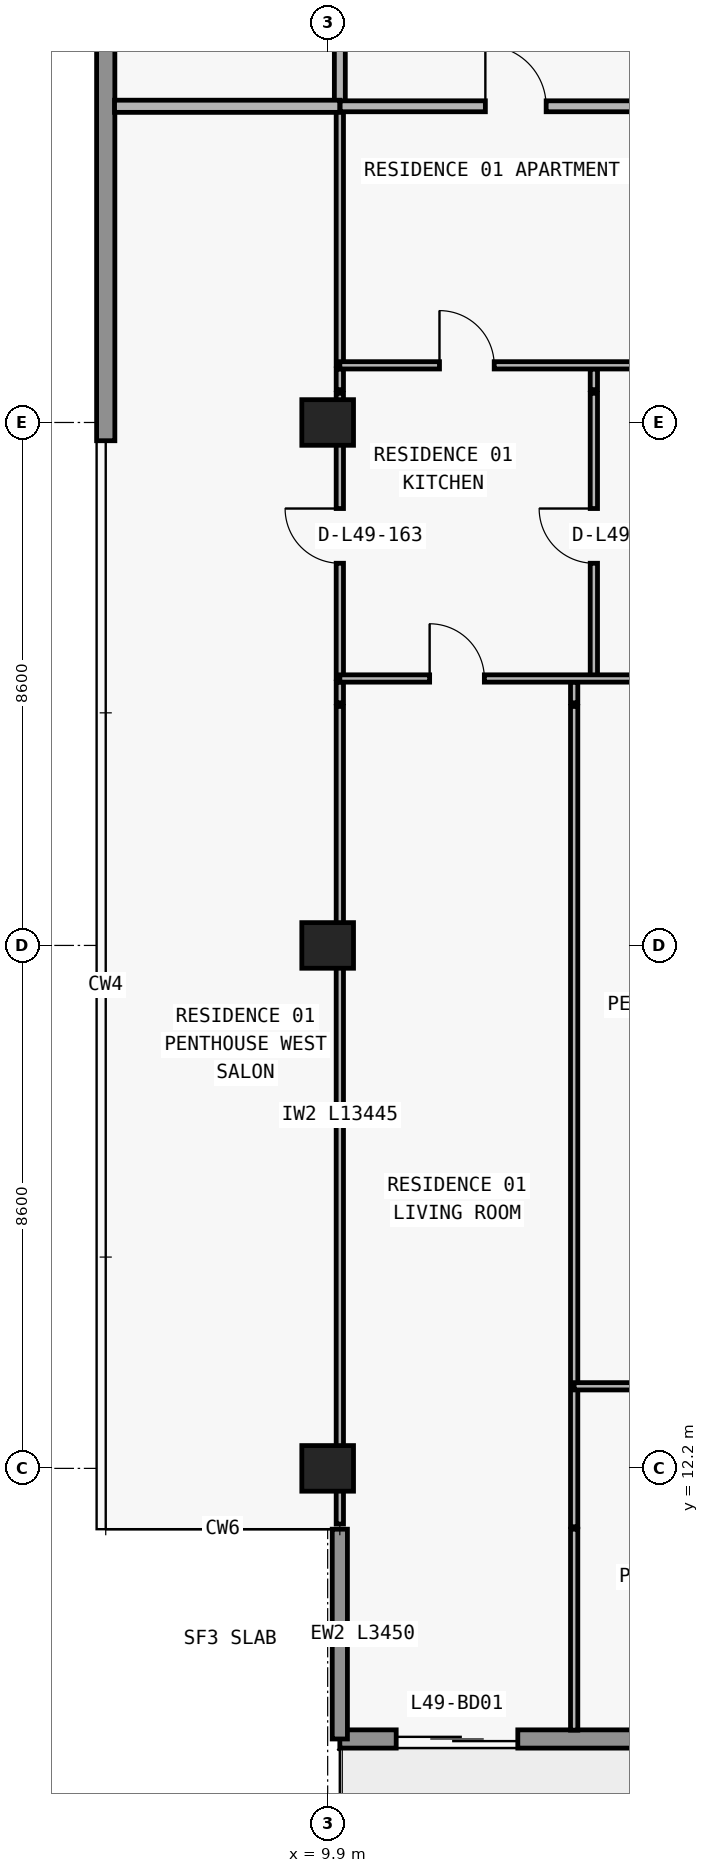
"""IFC4 building model, lengths in metres.
Left out: names, types, materials, properties, quantities, classifications, styles, units other than length and angle.
Written with IfcOpenShell. Run it as: python <this file> out.ifc"""

import sys

from ifc_helpers import new_model, si_unit, direction, frame, frame_2d, origin, origin_2d, place, context, subcontext, project, spatial, rectangle, extrude, element, fill, save


model = new_model("IFC4")
c1 = context("Model", 3, precision=1e-05, world=origin(), true_north=direction((0.0, 1.0)))
c2 = subcontext(c1, "Body", "Model", "MODEL_VIEW")
j1 = project(units=[si_unit("LENGTHUNIT", "METRE"), si_unit("PLANEANGLEUNIT", "RADIAN")], contexts=[c1])
p1 = place(None, origin())
s1 = spatial("IfcSite", under=j1, at=p1, CompositionType="ELEMENT")
p2 = place(p1, origin())
s2 = spatial("IfcBuilding", under=s1, at=p2, CompositionType="ELEMENT")
p3 = place(p2, frame((0.0, 0.0, 177.0)))
s3 = spatial("IfcBuildingStorey", under=s2, at=p3, CompositionType="ELEMENT", Elevation=177.0)
for number, where, z_axis, x_axis in (
    (1, (9.9, 12.2, 0.0), (0.0, 0.0, 1.0), (1.0, 0.0, 0.0)),
    (2, (9.9, 20.8, 0.0), (0.0, 0.0, 1.0), (1.0, 0.0, 0.0)),
    (3, (9.9, 29.4, 0.0), (0.0, 0.0, 1.0), (1.0, 0.0, 0.0)),
):
    element("IfcColumn", number, at=place(p3, frame(where, z_axis=z_axis, x_axis=x_axis)), inside=s3, PredefinedType="COLUMN", context=c2, shape_type="SweptSolid", body=[
        extrude(rectangle(XDim=0.85, YDim=0.75, at=origin_2d()), origin(), (0.0, 0.0, 1.0), 3.05),
    ])
p4 = place(p3, frame((67.7, 7.75, 0.0), z_axis=(0.0, 0.0, 1.0), x_axis=(-1.0, 0.0, 0.0)))
e4 = element("IfcWall", 4, at=p4, inside=s3, PredefinedType="STANDARD", context=c2, shape_type="SweptSolid", body=[
    extrude(rectangle(XDim=57.6, YDim=0.3, at=frame_2d((28.8, 0.0))), origin(), (0.0, 0.0, 1.0), 3.05),
])
p5 = place(p4, frame((54.673, 0.0, 0.0)))
e5 = element("IfcOpeningElement", 5, at=p5, cuts=e4, PredefinedType="OPENING", context=c2, shape_type="SweptSolid", body=[
    extrude(rectangle(XDim=2.0, YDim=2.3, at=frame_2d((1.0, 1.15))), frame((0.0, 0.16, 0.0), z_axis=(0.0, -1.0, 0.0), x_axis=(1.0, 0.0, 0.0)), (0.0, 0.0, 1.0), 0.32),
])
p6 = place(p4, frame((50.473, 0.0, 0.85)))
e6 = element("IfcOpeningElement", 6, at=p6, cuts=e4, PredefinedType="OPENING", context=c2, shape_type="SweptSolid", body=[
    extrude(rectangle(XDim=2.2, YDim=1.55, at=frame_2d((1.1, 0.775))), frame((0.0, 0.16, 0.0), z_axis=(0.0, -1.0, 0.0), x_axis=(1.0, 0.0, 0.0)), (0.0, 0.0, 1.0), 0.32),
])
p7 = place(p4, frame((46.09, 0.0, 0.0)))
e7 = element("IfcOpeningElement", 7, at=p7, cuts=e4, PredefinedType="OPENING", context=c2, shape_type="SweptSolid", body=[
    extrude(rectangle(XDim=2.0, YDim=2.3, at=frame_2d((1.0, 1.15))), frame((0.0, 0.16, 0.0), z_axis=(0.0, -1.0, 0.0), x_axis=(1.0, 0.0, 0.0)), (0.0, 0.0, 1.0), 0.32),
])
p8 = place(p4, frame((41.99, 0.0, 0.85)))
e8 = element("IfcOpeningElement", 8, at=p8, cuts=e4, PredefinedType="OPENING", context=c2, shape_type="SweptSolid", body=[
    extrude(rectangle(XDim=1.8, YDim=1.55, at=frame_2d((0.9, 0.775))), frame((0.0, 0.16, 0.0), z_axis=(0.0, -1.0, 0.0), x_axis=(1.0, 0.0, 0.0)), (0.0, 0.0, 1.0), 0.32),
])
p9 = place(p4, frame((38.09, 0.0, 0.0)))
e9 = element("IfcOpeningElement", 9, at=p9, cuts=e4, PredefinedType="OPENING", context=c2, shape_type="SweptSolid", body=[
    extrude(rectangle(XDim=2.0, YDim=2.3, at=frame_2d((1.0, 1.15))), frame((0.0, 0.16, 0.0), z_axis=(0.0, -1.0, 0.0), x_axis=(1.0, 0.0, 0.0)), (0.0, 0.0, 1.0), 0.32),
])
p10 = place(p4, frame((33.41, 0.0, 0.65)))
e10 = element("IfcOpeningElement", 10, at=p10, cuts=e4, PredefinedType="OPENING", context=c2, shape_type="SweptSolid", body=[
    extrude(rectangle(XDim=2.6, YDim=1.85, at=frame_2d((1.3, 0.925))), frame((0.0, 0.16, 0.0), z_axis=(0.0, -1.0, 0.0), x_axis=(1.0, 0.0, 0.0)), (0.0, 0.0, 1.0), 0.32),
])
p11 = place(p4, frame((27.7, 0.0, 0.85)))
e11 = element("IfcOpeningElement", 11, at=p11, cuts=e4, PredefinedType="OPENING", context=c2, shape_type="SweptSolid", body=[
    extrude(rectangle(XDim=2.2, YDim=1.55, at=frame_2d((1.1, 0.775))), frame((0.0, 0.16, 0.0), z_axis=(0.0, -1.0, 0.0), x_axis=(1.0, 0.0, 0.0)), (0.0, 0.0, 1.0), 0.32),
])
p12 = place(p4, frame((19.7, 0.0, 0.85)))
e12 = element("IfcOpeningElement", 12, at=p12, cuts=e4, PredefinedType="OPENING", context=c2, shape_type="SweptSolid", body=[
    extrude(rectangle(XDim=2.2, YDim=1.55, at=frame_2d((1.1, 0.775))), frame((0.0, 0.16, 0.0), z_axis=(0.0, -1.0, 0.0), x_axis=(1.0, 0.0, 0.0)), (0.0, 0.0, 1.0), 0.32),
])
p13 = place(p4, frame((13.29, 0.0, 0.0)))
e13 = element("IfcOpeningElement", 13, at=p13, cuts=e4, PredefinedType="OPENING", context=c2, shape_type="SweptSolid", body=[
    extrude(rectangle(XDim=2.0, YDim=2.3, at=frame_2d((1.0, 1.15))), frame((0.0, 0.16, 0.0), z_axis=(0.0, -1.0, 0.0), x_axis=(1.0, 0.0, 0.0)), (0.0, 0.0, 1.0), 0.32),
])
p14 = place(p4, frame((9.19, 0.0, 0.85)))
e14 = element("IfcOpeningElement", 14, at=p14, cuts=e4, PredefinedType="OPENING", context=c2, shape_type="SweptSolid", body=[
    extrude(rectangle(XDim=1.8, YDim=1.55, at=frame_2d((0.9, 0.775))), frame((0.0, 0.16, 0.0), z_axis=(0.0, -1.0, 0.0), x_axis=(1.0, 0.0, 0.0)), (0.0, 0.0, 1.0), 0.32),
])
p15 = place(p4, frame((5.273, 0.0, 0.0)))
e15 = element("IfcOpeningElement", 15, at=p15, cuts=e4, PredefinedType="OPENING", context=c2, shape_type="SweptSolid", body=[
    extrude(rectangle(XDim=2.0, YDim=2.3, at=frame_2d((1.0, 1.15))), frame((0.0, 0.16, 0.0), z_axis=(0.0, -1.0, 0.0), x_axis=(1.0, 0.0, 0.0)), (0.0, 0.0, 1.0), 0.32),
])
p16 = place(p4, frame((1.073, 0.0, 0.85)))
e16 = element("IfcOpeningElement", 16, at=p16, cuts=e4, PredefinedType="OPENING", context=c2, shape_type="SweptSolid", body=[
    extrude(rectangle(XDim=2.2, YDim=1.55, at=frame_2d((1.1, 0.775))), frame((0.0, 0.16, 0.0), z_axis=(0.0, -1.0, 0.0), x_axis=(1.0, 0.0, 0.0)), (0.0, 0.0, 1.0), 0.32),
])
p17 = place(p3, frame((10.1, 11.2, 0.0), z_axis=(0.0, 0.0, 1.0), x_axis=(0.0, -1.0, 0.0)))
e17 = element("IfcWall", 17, at=p17, inside=s3, PredefinedType="ELEMENTEDWALL", context=c2, shape_type="SweptSolid", body=[
    extrude(rectangle(XDim=3.45, YDim=0.25, at=frame_2d((1.725, 0.0))), origin(), (0.0, 0.0, 1.0), 3.05),
])
p18 = place(p3, frame((6.25, 29.1, 0.0), z_axis=(0.0, 0.0, 1.0), x_axis=(0.0, 1.0, 0.0)))
e18 = element("IfcWall", 18, at=p18, inside=s3, PredefinedType="STANDARD", context=c2, shape_type="SweptSolid", body=[
    extrude(rectangle(XDim=17.9, YDim=0.3, at=frame_2d((8.95, 0.0))), origin(), (0.0, 0.0, 1.0), 3.05),
])
p19 = place(p3, frame((10.1, 11.285, 0.0), z_axis=(0.0, 0.0, 1.0), x_axis=(0.0, 1.0, 0.0)))
e19 = element("IfcWall", 19, at=p19, inside=s3, PredefinedType="PARTITIONING", context=c2, shape_type="SweptSolid", body=[
    extrude(rectangle(XDim=13.445, YDim=0.12, at=frame_2d((6.723, 0.0))), origin(), (0.0, 0.0, 1.0), 2.263),
])
p20 = place(p3, frame((10.1, 24.79, 0.0), z_axis=(0.0, 0.0, 1.0), x_axis=(0.0, 1.0, 0.0)))
e20 = element("IfcWall", 20, at=p20, inside=s3, PredefinedType="PARTITIONING", context=c2, shape_type="SweptSolid", body=[
    extrude(rectangle(XDim=0.34, YDim=0.12, at=frame_2d((0.17, 0.0))), origin(), (0.0, 0.0, 1.0), 2.263),
])
p21 = place(p3, frame((10.1, 25.19, 0.0), z_axis=(0.0, 0.0, 1.0), x_axis=(0.0, 1.0, 0.0)))
e21 = element("IfcWall", 21, at=p21, inside=s3, PredefinedType="PARTITIONING", context=c2, shape_type="SweptSolid", body=[
    extrude(rectangle(XDim=4.69, YDim=0.12, at=frame_2d((2.345, 0.0))), origin(), (0.0, 0.0, 1.0), 2.263),
])
p22 = place(p21, frame((1.895, 0.0, 0.0)))
e22 = element("IfcOpeningElement", 22, at=p22, cuts=e21, PredefinedType="OPENING", context=c2, shape_type="SweptSolid", body=[
    extrude(rectangle(XDim=0.9, YDim=2.15, at=frame_2d((0.45, 1.075))), frame((0.0, 0.07, 0.0), z_axis=(0.0, -1.0, 0.0), x_axis=(1.0, 0.0, 0.0)), (0.0, 0.0, 1.0), 0.14),
])
p23 = place(p3, frame((10.1, 29.94, 0.0), z_axis=(0.0, 0.0, 1.0), x_axis=(0.0, 1.0, 0.0)))
e23 = element("IfcWall", 23, at=p23, inside=s3, PredefinedType="PARTITIONING", context=c2, shape_type="SweptSolid", body=[
    extrude(rectangle(XDim=0.34, YDim=0.12, at=frame_2d((0.17, 0.0))), origin(), (0.0, 0.0, 1.0), 2.263),
])
p24 = place(p3, frame((10.1, 30.34, 0.0), z_axis=(0.0, 0.0, 1.0), x_axis=(0.0, 1.0, 0.0)))
e24 = element("IfcWall", 24, at=p24, inside=s3, PredefinedType="PARTITIONING", context=c2, shape_type="SweptSolid", body=[
    extrude(rectangle(XDim=4.26, YDim=0.12, at=frame_2d((2.13, 0.0))), origin(), (0.0, 0.0, 1.0), 2.263),
])
p25 = place(p3, frame((10.1, 34.605, 0.0), z_axis=(0.0, 0.0, 1.0), x_axis=(0.0, 1.0, 0.0)))
e25 = element("IfcWall", 25, at=p25, inside=s3, PredefinedType="PARTITIONING", context=c2, shape_type="SweptSolid", body=[
    extrude(rectangle(XDim=2.345, YDim=0.18, at=frame_2d((1.172, 0.0))), origin(), (0.0, 0.0, 1.0), 2.263),
])
p26 = place(p3, frame((13.954, 7.895, 0.0), z_axis=(0.0, 0.0, 1.0), x_axis=(0.0, 1.0, 0.0)))
e26 = element("IfcWall", 26, at=p26, inside=s3, PredefinedType="PARTITIONING", context=c2, shape_type="SweptSolid", body=[
    extrude(rectangle(XDim=3.305, YDim=0.12, at=frame_2d((1.652, 0.0))), origin(), (0.0, 0.0, 1.0), 3.05),
])
p27 = place(p3, frame((13.954, 11.24, 0.0), z_axis=(0.0, 0.0, 1.0), x_axis=(0.0, 1.0, 0.0)))
e27 = element("IfcWall", 27, at=p27, inside=s3, PredefinedType="PARTITIONING", context=c2, shape_type="SweptSolid", body=[
    extrude(rectangle(XDim=13.49, YDim=0.12, at=frame_2d((6.745, 0.0))), origin(), (0.0, 0.0, 1.0), 2.499),
])
p28 = place(p3, frame((13.954, 24.79, 0.0), z_axis=(0.0, 0.0, 1.0), x_axis=(0.0, 1.0, 0.0)))
e28 = element("IfcWall", 28, at=p28, inside=s3, PredefinedType="PARTITIONING", context=c2, shape_type="SweptSolid", body=[
    extrude(rectangle(XDim=0.34, YDim=0.12, at=frame_2d((0.17, 0.0))), origin(), (0.0, 0.0, 1.0), 2.499),
])
p29 = place(p3, frame((14.278, 25.19, 0.0), z_axis=(0.0, 0.0, 1.0), x_axis=(0.0, 1.0, 0.0)))
e29 = element("IfcWall", 29, at=p29, inside=s3, PredefinedType="PARTITIONING", context=c2, shape_type="SweptSolid", body=[
    extrude(rectangle(XDim=4.69, YDim=0.12, at=frame_2d((2.345, 0.0))), origin(), (0.0, 0.0, 1.0), 2.499),
])
p30 = place(p29, frame((1.895, 0.0, 0.0)))
e30 = element("IfcOpeningElement", 30, at=p30, cuts=e29, PredefinedType="OPENING", context=c2, shape_type="SweptSolid", body=[
    extrude(rectangle(XDim=0.9, YDim=2.15, at=frame_2d((0.45, 1.075))), frame((0.0, 0.07, 0.0), z_axis=(0.0, -1.0, 0.0), x_axis=(1.0, 0.0, 0.0)), (0.0, 0.0, 1.0), 0.14),
])
p31 = place(p3, frame((14.278, 29.94, 0.0), z_axis=(0.0, 0.0, 1.0), x_axis=(0.0, 1.0, 0.0)))
e31 = element("IfcWall", 31, at=p31, inside=s3, PredefinedType="PARTITIONING", context=c2, shape_type="SweptSolid", body=[
    extrude(rectangle(XDim=0.34, YDim=0.12, at=frame_2d((0.17, 0.0))), origin(), (0.0, 0.0, 1.0), 2.499),
])
p32 = place(p3, frame((13.954, 13.55, 0.0), z_axis=(0.0, 0.0, 1.0), x_axis=(1.0, 0.0, 0.0)))
e32 = element("IfcWall", 32, at=p32, inside=s3, PredefinedType="PARTITIONING", context=c2, shape_type="SweptSolid", body=[
    extrude(rectangle(XDim=4.296, YDim=0.12, at=frame_2d((2.148, 0.0))), origin(), (0.0, 0.0, 1.0), 3.05),
])
p33 = place(p32, frame((1.698, 0.0, 0.0)))
e33 = element("IfcOpeningElement", 33, at=p33, cuts=e32, PredefinedType="OPENING", context=c2, shape_type="SweptSolid", body=[
    extrude(rectangle(XDim=0.9, YDim=2.15, at=frame_2d((0.45, 1.075))), frame((0.0, 0.07, 0.0), z_axis=(0.0, -1.0, 0.0), x_axis=(1.0, 0.0, 0.0)), (0.0, 0.0, 1.0), 0.14),
])
p34 = place(p3, frame((10.1, 25.19, 0.0), z_axis=(0.0, 0.0, 1.0), x_axis=(1.0, 0.0, 0.0)))
e34 = element("IfcWall", 34, at=p34, inside=s3, PredefinedType="PARTITIONING", context=c2, shape_type="SweptSolid", body=[
    extrude(rectangle(XDim=8.15, YDim=0.12, at=frame_2d((4.075, 0.0))), origin(), (0.0, 0.0, 1.0), 3.05),
])
p35 = place(p34, frame((1.477, 0.0, 0.0)))
e35 = element("IfcOpeningElement", 35, at=p35, cuts=e34, PredefinedType="OPENING", context=c2, shape_type="SweptSolid", body=[
    extrude(rectangle(XDim=0.9, YDim=2.15, at=frame_2d((0.45, 1.075))), frame((0.0, 0.07, 0.0), z_axis=(0.0, -1.0, 0.0), x_axis=(1.0, 0.0, 0.0)), (0.0, 0.0, 1.0), 0.14),
])
p36 = place(p34, frame((5.714, 0.0, 0.0)))
e36 = element("IfcOpeningElement", 36, at=p36, cuts=e34, PredefinedType="OPENING", context=c2, shape_type="SweptSolid", body=[
    extrude(rectangle(XDim=0.9, YDim=2.15, at=frame_2d((0.45, 1.075))), frame((0.0, 0.07, 0.0), z_axis=(0.0, -1.0, 0.0), x_axis=(1.0, 0.0, 0.0)), (0.0, 0.0, 1.0), 0.14),
])
p37 = place(p3, frame((10.1, 30.34, 0.0), z_axis=(0.0, 0.0, 1.0), x_axis=(1.0, 0.0, 0.0)))
e37 = element("IfcWall", 37, at=p37, inside=s3, PredefinedType="PARTITIONING", context=c2, shape_type="SweptSolid", body=[
    extrude(rectangle(XDim=8.15, YDim=0.12, at=frame_2d((4.075, 0.0))), origin(), (0.0, 0.0, 1.0), 3.05),
])
p38 = place(p37, frame((1.639, 0.0, 0.0)))
e38 = element("IfcOpeningElement", 38, at=p38, cuts=e37, PredefinedType="OPENING", context=c2, shape_type="SweptSolid", body=[
    extrude(rectangle(XDim=0.9, YDim=2.15, at=frame_2d((0.45, 1.075))), frame((0.0, 0.07, 0.0), z_axis=(0.0, -1.0, 0.0), x_axis=(1.0, 0.0, 0.0)), (0.0, 0.0, 1.0), 0.14),
])
p39 = place(p3, frame((6.395, 34.6, 0.0), z_axis=(0.0, 0.0, 1.0), x_axis=(1.0, 0.0, 0.0)))
e39 = element("IfcWall", 39, at=p39, inside=s3, PredefinedType="PARTITIONING", context=c2, shape_type="SweptSolid", body=[
    extrude(rectangle(XDim=3.705, YDim=0.2, at=frame_2d((1.853, 0.0))), origin(), (0.0, 0.0, 1.0), 3.05),
])
p40 = place(p3, frame((10.105, 34.6, 0.0), z_axis=(0.0, 0.0, 1.0), x_axis=(1.0, 0.0, 0.0)))
e40 = element("IfcWall", 40, at=p40, inside=s3, PredefinedType="PARTITIONING", context=c2, shape_type="SweptSolid", body=[
    extrude(rectangle(XDim=8.145, YDim=0.18, at=frame_2d((4.073, 0.0))), origin(), (0.0, 0.0, 1.0), 3.05),
])
p41 = place(p40, frame((2.388, 0.0, 0.0)))
e41 = element("IfcOpeningElement", 41, at=p41, cuts=e40, PredefinedType="OPENING", context=c2, shape_type="SweptSolid", body=[
    extrude(rectangle(XDim=1.0, YDim=2.2, at=frame_2d((0.5, 1.1))), frame((0.0, 0.1, 0.0), z_axis=(0.0, -1.0, 0.0), x_axis=(1.0, 0.0, 0.0)), (0.0, 0.0, 1.0), 0.2),
])
p42 = place(p5, origin())
e42 = element("IfcDoor", 42, at=p42, inside=s3, OperationType="DOUBLE_DOOR_SLIDING", PredefinedType="DOOR", context=c2, shape_type="SweptSolid", body=[
    extrude(rectangle(XDim=2.0, YDim=2.3, at=frame_2d((1.0, 1.15))), frame((0.0, 0.025, 0.0), z_axis=(0.0, -1.0, 0.0), x_axis=(1.0, 0.0, 0.0)), (0.0, 0.0, 1.0), 0.05),
])
fill(e5, e42)
p43 = place(p41, origin())
e43 = element("IfcDoor", 43, at=p43, inside=s3, OperationType="SINGLE_SWING_LEFT", PredefinedType="DOOR", context=c2, shape_type="SweptSolid", body=[
    extrude(rectangle(XDim=1.0, YDim=2.2, at=frame_2d((0.5, 1.1))), frame((0.0, 0.025, 0.0), z_axis=(0.0, -1.0, 0.0), x_axis=(1.0, 0.0, 0.0)), (0.0, 0.0, 1.0), 0.05),
])
fill(e41, e43)
p44 = place(p38, origin())
e44 = element("IfcDoor", 44, at=p44, inside=s3, OperationType="SINGLE_SWING_LEFT", PredefinedType="DOOR", context=c2, shape_type="SweptSolid", body=[
    extrude(rectangle(XDim=0.9, YDim=2.15, at=frame_2d((0.45, 1.075))), frame((0.0, 0.025, 0.0), z_axis=(0.0, -1.0, 0.0), x_axis=(1.0, 0.0, 0.0)), (0.0, 0.0, 1.0), 0.05),
])
fill(e38, e44)
p45 = place(p30, origin())
e45 = element("IfcDoor", 45, at=p45, inside=s3, OperationType="SINGLE_SWING_RIGHT", PredefinedType="DOOR", context=c2, shape_type="SweptSolid", body=[
    extrude(rectangle(XDim=0.9, YDim=2.15, at=frame_2d((0.45, 1.075))), frame((0.0, 0.025, 0.0), z_axis=(0.0, -1.0, 0.0), x_axis=(1.0, 0.0, 0.0)), (0.0, 0.0, 1.0), 0.05),
])
fill(e30, e45)
p46 = place(p35, origin())
e46 = element("IfcDoor", 46, at=p46, inside=s3, OperationType="SINGLE_SWING_LEFT", PredefinedType="DOOR", context=c2, shape_type="SweptSolid", body=[
    extrude(rectangle(XDim=0.9, YDim=2.15, at=frame_2d((0.45, 1.075))), frame((0.0, 0.025, 0.0), z_axis=(0.0, -1.0, 0.0), x_axis=(1.0, 0.0, 0.0)), (0.0, 0.0, 1.0), 0.05),
])
fill(e35, e46)
p47 = place(p22, origin())
e47 = element("IfcDoor", 47, at=p47, inside=s3, OperationType="SINGLE_SWING_RIGHT", PredefinedType="DOOR", context=c2, shape_type="SweptSolid", body=[
    extrude(rectangle(XDim=0.9, YDim=2.15, at=frame_2d((0.45, 1.075))), frame((0.0, 0.025, 0.0), z_axis=(0.0, -1.0, 0.0), x_axis=(1.0, 0.0, 0.0)), (0.0, 0.0, 1.0), 0.05),
])
fill(e22, e47)
save(model, sys.argv[1])
